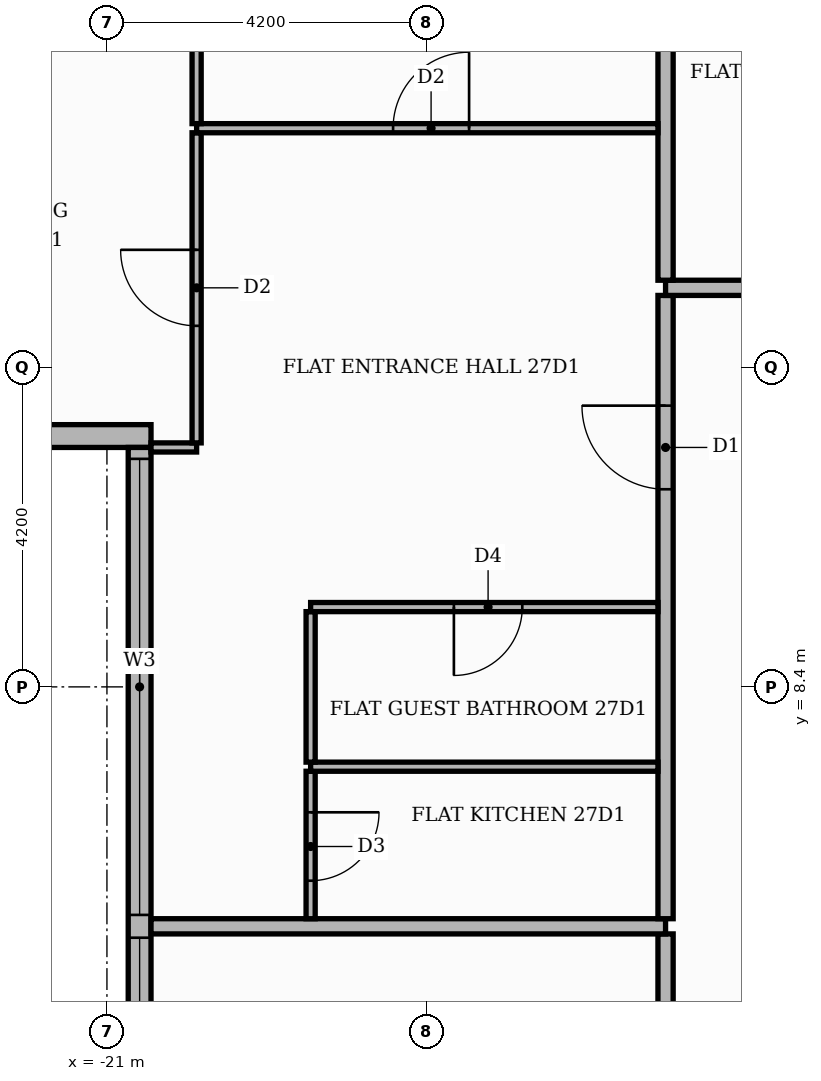
"""IFC4 building model, lengths in metres.
Left out: names, types, materials, properties, quantities, classifications, styles, units other than length and angle.
Written with IfcOpenShell. Run it as: python <this file> out.ifc"""

import sys

from ifc_helpers import new_model, si_unit, direction, frame, frame_2d, origin, place, context, subcontext, project, spatial, rectangle, extrude, element, fill, save


model = new_model("IFC4")
c1 = context("Model", 3, precision=1e-05, world=origin(), true_north=direction((0.0, 1.0)))
c2 = subcontext(c1, "Body", "Model", "MODEL_VIEW")
j1 = project(units=[si_unit("LENGTHUNIT", "METRE"), si_unit("PLANEANGLEUNIT", "RADIAN")], contexts=[c1])
p1 = place(None, origin())
s1 = spatial("IfcSite", under=j1, at=p1, CompositionType="ELEMENT")
p2 = place(p1, origin())
s2 = spatial("IfcBuilding", under=s1, at=p2, CompositionType="ELEMENT")
p3 = place(p2, frame((0.0, 0.0, 114.3)))
s3 = spatial("IfcBuildingStorey", under=s2, at=p3, CompositionType="ELEMENT", Elevation=114.3)
p4 = place(p3, frame((-25.42, 11.7, 0.0), z_axis=(0.0, 0.0, 1.0), x_axis=(1.0, 0.0, 0.0)))
e1 = element("IfcWall", 1, at=p4, inside=s3, PredefinedType="STANDARD", context=c2, shape_type="SweptSolid", body=[
    extrude(rectangle(XDim=5.0, YDim=0.3, at=frame_2d((2.5, 0.0))), origin(), (0.0, 0.0, 1.0), 3.48),
])
p5 = place(p4, frame((1.42, 0.0, 0.9)))
e2 = element("IfcOpeningElement", 2, at=p5, cuts=e1, PredefinedType="OPENING", context=c2, shape_type="SweptSolid", body=[
    extrude(rectangle(XDim=1.8, YDim=2.1, at=frame_2d((0.9, 1.05))), frame((0.0, 0.16, 0.0), z_axis=(0.0, -1.0, 0.0), x_axis=(1.0, 0.0, 0.0)), (0.0, 0.0, 1.0), 0.32),
])
p6 = place(p3, frame((-20.57, 11.55, 0.0), z_axis=(0.0, 0.0, 1.0), x_axis=(0.0, -1.0, 0.0)))
e3 = element("IfcWall", 3, at=p6, inside=s3, PredefinedType="STANDARD", context=c2, shape_type="SweptSolid", body=[
    extrude(rectangle(XDim=23.4, YDim=0.3, at=frame_2d((11.7, 0.0))), origin(), (0.0, 0.0, 1.0), 3.48),
])
p7 = place(p6, frame((0.15, 0.0, 0.9)))
e4 = element("IfcOpeningElement", 4, at=p7, cuts=e3, PredefinedType="OPENING", context=c2, shape_type="SweptSolid", body=[
    extrude(rectangle(XDim=6.0, YDim=2.1, at=frame_2d((3.0, 1.05))), frame((0.0, 0.16, 0.0), z_axis=(0.0, -1.0, 0.0), x_axis=(1.0, 0.0, 0.0)), (0.0, 0.0, 1.0), 0.32),
])
p8 = place(p6, frame((6.45, 0.0, 0.9)))
e5 = element("IfcOpeningElement", 5, at=p8, cuts=e3, PredefinedType="OPENING", context=c2, shape_type="SweptSolid", body=[
    extrude(rectangle(XDim=6.0, YDim=2.1, at=frame_2d((3.0, 1.05))), frame((0.0, 0.16, 0.0), z_axis=(0.0, -1.0, 0.0), x_axis=(1.0, 0.0, 0.0)), (0.0, 0.0, 1.0), 0.32),
])
p9 = place(p6, frame((12.75, 0.0, 0.9)))
e6 = element("IfcOpeningElement", 6, at=p9, cuts=e3, PredefinedType="OPENING", context=c2, shape_type="SweptSolid", body=[
    extrude(rectangle(XDim=6.0, YDim=2.1, at=frame_2d((3.0, 1.05))), frame((0.0, 0.16, 0.0), z_axis=(0.0, -1.0, 0.0), x_axis=(1.0, 0.0, 0.0)), (0.0, 0.0, 1.0), 0.32),
])
p10 = place(p6, frame((19.05, 0.0, 0.9)))
e7 = element("IfcOpeningElement", 7, at=p10, cuts=e3, PredefinedType="OPENING", context=c2, shape_type="SweptSolid", body=[
    extrude(rectangle(XDim=3.9, YDim=2.1, at=frame_2d((1.95, 1.05))), frame((0.0, 0.16, 0.0), z_axis=(0.0, -1.0, 0.0), x_axis=(1.0, 0.0, 0.0)), (0.0, 0.0, 1.0), 0.32),
])
p11 = place(p3, frame((-13.65, -13.55, 0.0), z_axis=(0.0, 0.0, 1.0), x_axis=(0.0, 1.0, 0.0)))
e8 = element("IfcWall", 8, at=p11, inside=s3, PredefinedType="PARTITIONING", context=c2, shape_type="SweptSolid", body=[
    extrude(rectangle(XDim=18.7, YDim=0.2, at=frame_2d((9.35, 0.0))), origin(), (0.0, 0.0, 1.0), 3.48),
])
p12 = place(p11, frame((16.15, 0.0, 0.0)))
e9 = element("IfcOpeningElement", 9, at=p12, cuts=e8, PredefinedType="OPENING", context=c2, shape_type="SweptSolid", body=[
    extrude(rectangle(XDim=1.1, YDim=2.4, at=frame_2d((0.55, 1.2))), frame((0.0, 0.11, 0.0), z_axis=(0.0, -1.0, 0.0), x_axis=(1.0, 0.0, 0.0)), (0.0, 0.0, 1.0), 0.22),
])
p13 = place(p3, frame((-20.42, 5.25, 0.0), z_axis=(0.0, 0.0, 1.0), x_axis=(1.0, 0.0, 0.0)))
e10 = element("IfcWall", 10, at=p13, inside=s3, PredefinedType="PARTITIONING", context=c2, shape_type="SweptSolid", body=[
    extrude(rectangle(XDim=6.77, YDim=0.2, at=frame_2d((3.385, 0.0))), origin(), (0.0, 0.0, 1.0), 3.48),
])
p14 = place(p3, frame((-18.32, 5.35, 0.0), z_axis=(0.0, 0.0, 1.0), x_axis=(0.0, 1.0, 0.0)))
e11 = element("IfcWall", 11, at=p14, inside=s3, PredefinedType="PARTITIONING", context=c2, shape_type="SweptSolid", body=[
    extrude(rectangle(XDim=1.94, YDim=0.12, at=frame_2d((0.97, 0.0))), origin(), (0.0, 0.0, 1.0), 3.48),
])
p15 = place(p14, frame((0.5, 0.0, 0.0)))
e12 = element("IfcOpeningElement", 12, at=p15, cuts=e11, PredefinedType="OPENING", context=c2, shape_type="SweptSolid", body=[
    extrude(rectangle(XDim=0.9, YDim=2.1, at=frame_2d((0.45, 1.05))), frame((0.0, 0.07, 0.0), z_axis=(0.0, -1.0, 0.0), x_axis=(1.0, 0.0, 0.0)), (0.0, 0.0, 1.0), 0.14),
])
p16 = place(p3, frame((-13.65, 5.35, 0.0), z_axis=(0.0, 0.0, 1.0), x_axis=(0.0, 1.0, 0.0)))
e13 = element("IfcWall", 13, at=p16, inside=s3, PredefinedType="PARTITIONING", context=c2, shape_type="SweptSolid", body=[
    extrude(rectangle(XDim=8.2, YDim=0.2, at=frame_2d((4.1, 0.0))), origin(), (0.0, 0.0, 1.0), 3.48),
])
p17 = place(p16, frame((5.65, 0.0, 0.0)))
e14 = element("IfcOpeningElement", 14, at=p17, cuts=e13, PredefinedType="OPENING", context=c2, shape_type="SweptSolid", body=[
    extrude(rectangle(XDim=1.1, YDim=2.4, at=frame_2d((0.55, 1.2))), frame((0.0, 0.11, 0.0), z_axis=(0.0, -1.0, 0.0), x_axis=(1.0, 0.0, 0.0)), (0.0, 0.0, 1.0), 0.22),
])
p18 = place(p3, frame((-18.32, 7.35, 0.0), z_axis=(0.0, 0.0, 1.0), x_axis=(1.0, 0.0, 0.0)))
e15 = element("IfcWall", 15, at=p18, inside=s3, PredefinedType="PARTITIONING", context=c2, shape_type="SweptSolid", body=[
    extrude(rectangle(XDim=4.57, YDim=0.12, at=frame_2d((2.285, 0.0))), origin(), (0.0, 0.0, 1.0), 3.48),
])
p19 = place(p3, frame((-18.32, 7.41, 0.0), z_axis=(0.0, 0.0, 1.0), x_axis=(0.0, 1.0, 0.0)))
e16 = element("IfcWall", 16, at=p19, inside=s3, PredefinedType="PARTITIONING", context=c2, shape_type="SweptSolid", body=[
    extrude(rectangle(XDim=1.98, YDim=0.12, at=frame_2d((0.99, 0.0))), origin(), (0.0, 0.0, 1.0), 3.48),
])
p20 = place(p3, frame((-18.32, 9.45, 0.0), z_axis=(0.0, 0.0, 1.0), x_axis=(1.0, 0.0, 0.0)))
e17 = element("IfcWall", 17, at=p20, inside=s3, PredefinedType="PARTITIONING", context=c2, shape_type="SweptSolid", body=[
    extrude(rectangle(XDim=4.57, YDim=0.12, at=frame_2d((2.285, 0.0))), origin(), (0.0, 0.0, 1.0), 3.48),
])
p21 = place(p20, frame((1.885, 0.0, 0.0)))
e18 = element("IfcOpeningElement", 18, at=p21, cuts=e17, PredefinedType="OPENING", context=c2, shape_type="SweptSolid", body=[
    extrude(rectangle(XDim=0.9, YDim=2.1, at=frame_2d((0.45, 1.05))), frame((0.0, 0.07, 0.0), z_axis=(0.0, -1.0, 0.0), x_axis=(1.0, 0.0, 0.0)), (0.0, 0.0, 1.0), 0.14),
])
p22 = place(p3, frame((-20.42, 11.55, 0.0), z_axis=(0.0, 0.0, 1.0), x_axis=(1.0, 0.0, 0.0)))
e19 = element("IfcWall", 19, at=p22, inside=s3, PredefinedType="PARTITIONING", context=c2, shape_type="SweptSolid", body=[
    extrude(rectangle(XDim=0.6, YDim=0.12, at=frame_2d((0.3, 0.0))), origin(), (0.0, 0.0, 1.0), 3.48),
])
p23 = place(p3, frame((-19.82, 11.61, 0.0), z_axis=(0.0, 0.0, 1.0), x_axis=(0.0, 1.0, 0.0)))
e20 = element("IfcWall", 20, at=p23, inside=s3, PredefinedType="PARTITIONING", context=c2, shape_type="SweptSolid", body=[
    extrude(rectangle(XDim=4.08, YDim=0.12, at=frame_2d((2.04, 0.0))), origin(), (0.0, 0.0, 1.0), 3.48),
])
p24 = place(p23, frame((1.54, 0.0, 0.0)))
e21 = element("IfcOpeningElement", 21, at=p24, cuts=e20, PredefinedType="OPENING", context=c2, shape_type="SweptSolid", body=[
    extrude(rectangle(XDim=1.0, YDim=2.1, at=frame_2d((0.5, 1.05))), frame((0.0, 0.07, 0.0), z_axis=(0.0, -1.0, 0.0), x_axis=(1.0, 0.0, 0.0)), (0.0, 0.0, 1.0), 0.14),
])
p25 = place(p3, frame((-13.65, 13.65, 0.0), z_axis=(0.0, 0.0, 1.0), x_axis=(1.0, 0.0, 0.0)))
e22 = element("IfcWall", 22, at=p25, inside=s3, PredefinedType="PARTITIONING", context=c2, shape_type="SweptSolid", body=[
    extrude(rectangle(XDim=39.07, YDim=0.2, at=frame_2d((19.535, 0.0))), origin(), (0.0, 0.0, 1.0), 3.48),
])
p26 = place(p25, frame((24.65, 0.0, 0.0)))
e23 = element("IfcOpeningElement", 23, at=p26, cuts=e22, PredefinedType="OPENING", context=c2, shape_type="SweptSolid", body=[
    extrude(rectangle(XDim=1.1, YDim=2.4, at=frame_2d((0.55, 1.2))), frame((0.0, 0.11, 0.0), z_axis=(0.0, -1.0, 0.0), x_axis=(1.0, 0.0, 0.0)), (0.0, 0.0, 1.0), 0.22),
])
p27 = place(p3, frame((-13.65, 13.75, 0.0), z_axis=(0.0, 0.0, 1.0), x_axis=(0.0, 1.0, 0.0)))
e24 = element("IfcWall", 24, at=p27, inside=s3, PredefinedType="PARTITIONING", context=c2, shape_type="SweptSolid", body=[
    extrude(rectangle(XDim=11.67, YDim=0.2, at=frame_2d((5.835, 0.0))), origin(), (0.0, 0.0, 1.0), 3.48),
])
p28 = place(p3, frame((-19.82, 15.75, 0.0), z_axis=(0.0, 0.0, 1.0), x_axis=(1.0, 0.0, 0.0)))
e25 = element("IfcWall", 25, at=p28, inside=s3, PredefinedType="PARTITIONING", context=c2, shape_type="SweptSolid", body=[
    extrude(rectangle(XDim=6.07, YDim=0.12, at=frame_2d((3.035, 0.0))), origin(), (0.0, 0.0, 1.0), 3.48),
])
p29 = place(p28, frame((2.585, 0.0, 0.0)))
e26 = element("IfcOpeningElement", 26, at=p29, cuts=e25, PredefinedType="OPENING", context=c2, shape_type="SweptSolid", body=[
    extrude(rectangle(XDim=1.0, YDim=2.1, at=frame_2d((0.5, 1.05))), frame((0.0, 0.07, 0.0), z_axis=(0.0, -1.0, 0.0), x_axis=(1.0, 0.0, 0.0)), (0.0, 0.0, 1.0), 0.14),
])
p30 = place(p3, frame((-19.82, 15.81, 0.0), z_axis=(0.0, 0.0, 1.0), x_axis=(0.0, 1.0, 0.0)))
e27 = element("IfcWall", 27, at=p30, inside=s3, PredefinedType="PARTITIONING", context=c2, shape_type="SweptSolid", body=[
    extrude(rectangle(XDim=1.59, YDim=0.12, at=frame_2d((0.795, 0.0))), origin(), (0.0, 0.0, 1.0), 3.48),
])
p31 = place(p7, origin())
e28 = element("IfcWindow", 28, at=p31, inside=s3, PartitioningType="SINGLE_PANEL", PredefinedType="WINDOW", context=c2, shape_type="SweptSolid", body=[
    extrude(rectangle(XDim=6.0, YDim=2.1, at=frame_2d((3.0, 1.05))), frame((0.0, 0.03, 0.0), z_axis=(0.0, -1.0, 0.0), x_axis=(1.0, 0.0, 0.0)), (0.0, 0.0, 1.0), 0.06),
])
fill(e4, e28)
p32 = place(p8, origin())
e29 = element("IfcWindow", 29, at=p32, inside=s3, PartitioningType="SINGLE_PANEL", PredefinedType="WINDOW", context=c2, shape_type="SweptSolid", body=[
    extrude(rectangle(XDim=6.0, YDim=2.1, at=frame_2d((3.0, 1.05))), frame((0.0, 0.03, 0.0), z_axis=(0.0, -1.0, 0.0), x_axis=(1.0, 0.0, 0.0)), (0.0, 0.0, 1.0), 0.06),
])
fill(e5, e29)
p33 = place(p17, origin())
e30 = element("IfcDoor", 30, at=p33, inside=s3, OperationType="SINGLE_SWING_RIGHT", PredefinedType="DOOR", context=c2, shape_type="SweptSolid", body=[
    extrude(rectangle(XDim=1.1, YDim=2.4, at=frame_2d((0.55, 1.2))), frame((0.0, 0.025, 0.0), z_axis=(0.0, -1.0, 0.0), x_axis=(1.0, 0.0, 0.0)), (0.0, 0.0, 1.0), 0.05),
])
fill(e14, e30)
p34 = place(p29, origin())
e31 = element("IfcDoor", 31, at=p34, inside=s3, OperationType="SINGLE_SWING_RIGHT", PredefinedType="DOOR", context=c2, shape_type="SweptSolid", body=[
    extrude(rectangle(XDim=1.0, YDim=2.1, at=frame_2d((0.5, 1.05))), frame((0.0, 0.025, 0.0), z_axis=(0.0, -1.0, 0.0), x_axis=(1.0, 0.0, 0.0)), (0.0, 0.0, 1.0), 0.05),
])
fill(e26, e31)
p35 = place(p21, frame((0.9, 0.0, 0.0), z_axis=(0.0, 0.0, 1.0), x_axis=(-1.0, 0.0, 0.0)))
e32 = element("IfcDoor", 32, at=p35, inside=s3, OperationType="SINGLE_SWING_LEFT", PredefinedType="DOOR", context=c2, shape_type="SweptSolid", body=[
    extrude(rectangle(XDim=0.9, YDim=2.1, at=frame_2d((0.45, 1.05))), frame((0.0, 0.025, 0.0), z_axis=(0.0, -1.0, 0.0), x_axis=(1.0, 0.0, 0.0)), (0.0, 0.0, 1.0), 0.05),
])
fill(e18, e32)
p36 = place(p15, frame((0.9, 0.0, 0.0), z_axis=(0.0, 0.0, 1.0), x_axis=(-1.0, 0.0, 0.0)))
e33 = element("IfcDoor", 33, at=p36, inside=s3, OperationType="SINGLE_SWING_RIGHT", PredefinedType="DOOR", context=c2, shape_type="SweptSolid", body=[
    extrude(rectangle(XDim=0.9, YDim=2.1, at=frame_2d((0.45, 1.05))), frame((0.0, 0.025, 0.0), z_axis=(0.0, -1.0, 0.0), x_axis=(1.0, 0.0, 0.0)), (0.0, 0.0, 1.0), 0.05),
])
fill(e12, e33)
p37 = place(p24, origin())
e34 = element("IfcDoor", 34, at=p37, inside=s3, OperationType="SINGLE_SWING_RIGHT", PredefinedType="DOOR", context=c2, shape_type="SweptSolid", body=[
    extrude(rectangle(XDim=1.0, YDim=2.1, at=frame_2d((0.5, 1.05))), frame((0.0, 0.025, 0.0), z_axis=(0.0, -1.0, 0.0), x_axis=(1.0, 0.0, 0.0)), (0.0, 0.0, 1.0), 0.05),
])
fill(e21, e34)
save(model, sys.argv[1])
